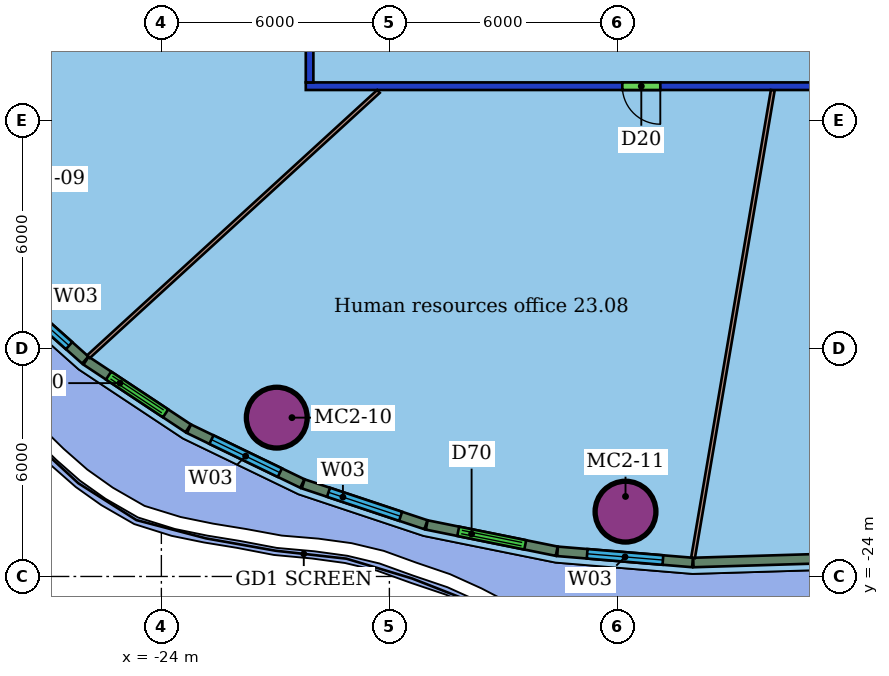
"""IFC4 building model, lengths in metres.
Left out: names, types, materials, properties, quantities, classifications, styles, units other than length and angle.
Written with IfcOpenShell. Run it as: python <this file> out.ifc"""

import sys

from ifc_helpers import new_model, si_unit, direction, frame, frame_2d, origin, origin_2d, place, context, subcontext, project, spatial, rectangle, hollow_circle, extrude, element, fill, save


model = new_model("IFC4")
c1 = context("Model", 3, precision=1e-05, world=origin(), true_north=direction((0.0, 1.0)))
c2 = subcontext(c1, "Body", "Model", "MODEL_VIEW")
j1 = project(units=[si_unit("LENGTHUNIT", "METRE"), si_unit("PLANEANGLEUNIT", "RADIAN")], contexts=[c1])
p1 = place(None, origin())
s1 = spatial("IfcSite", under=j1, at=p1, CompositionType="ELEMENT")
p2 = place(p1, origin())
s2 = spatial("IfcBuilding", under=s1, at=p2, CompositionType="ELEMENT")
p3 = place(p2, frame((0.0, 0.0, 103.0)))
s3 = spatial("IfcBuildingStorey", under=s2, at=p3, CompositionType="ELEMENT", Elevation=103.0)
for number, where, z_axis, x_axis in (
    (1, (-20.963, -19.821, 0.0), (0.0, 0.0, 1.0), (1.0, 0.0, 0.0)),
    (2, (-11.787, -22.294, 0.0), (0.0, 0.0, 1.0), (1.0, 0.0, 0.0)),
):
    element("IfcColumn", number, at=place(p3, frame(where, z_axis=z_axis, x_axis=x_axis)), inside=s3, PredefinedType="COLUMN", context=c2, shape_type="SweptSolid", body=[
        extrude(hollow_circle(Radius=0.8, WallThickness=0.055, at=origin_2d()), origin(), (0.0, 0.0, 1.0), 3.45),
    ])
p4 = place(p3, frame((8.2, -11.1, 0.0), z_axis=(0.0, 0.0, 1.0), x_axis=(-1.0, 0.0, 0.0)))
e3 = element("IfcWall", 3, at=p4, inside=s3, PredefinedType="PARTITIONING", context=c2, shape_type="SweptSolid", body=[
    extrude(rectangle(XDim=28.4, YDim=0.2, at=frame_2d((14.2, 0.0))), origin(), (0.0, 0.0, 1.0), 3.0),
])
p5 = place(p4, frame((19.071, 0.0, 0.0)))
e4 = element("IfcOpeningElement", 4, at=p5, cuts=e3, PredefinedType="OPENING", context=c2, shape_type="SweptSolid", body=[
    extrude(rectangle(XDim=1.0, YDim=2.1, at=frame_2d((0.5, 1.05))), frame((0.0, 0.11, 0.0), z_axis=(0.0, -1.0, 0.0), x_axis=(1.0, 0.0, 0.0)), (0.0, 0.0, 1.0), 0.22),
])
p6 = place(p4, frame((9.847, 0.0, 0.0)))
e5 = element("IfcOpeningElement", 5, at=p6, cuts=e3, PredefinedType="OPENING", context=c2, shape_type="SweptSolid", body=[
    extrude(rectangle(XDim=1.8, YDim=2.1, at=frame_2d((0.9, 1.05))), frame((0.0, 0.11, 0.0), z_axis=(0.0, -1.0, 0.0), x_axis=(1.0, 0.0, 0.0)), (0.0, 0.0, 1.0), 0.22),
])
p7 = place(p3, frame((-20.1, -11.0, 0.0), z_axis=(0.0, 0.0, 1.0), x_axis=(0.0, 1.0, 0.0)))
e6 = element("IfcWall", 6, at=p7, inside=s3, PredefinedType="PARTITIONING", context=c2, shape_type="SweptSolid", body=[
    extrude(rectangle(XDim=22.0, YDim=0.2, at=frame_2d((11.0, 0.0))), origin(), (0.0, 0.0, 1.0), 3.0),
])
p8 = place(p7, frame((15.485, 0.0, 0.0)))
e7 = element("IfcOpeningElement", 7, at=p8, cuts=e6, PredefinedType="OPENING", context=c2, shape_type="SweptSolid", body=[
    extrude(rectangle(XDim=1.5, YDim=2.1, at=frame_2d((0.75, 1.05))), frame((0.0, 0.11, 0.0), z_axis=(0.0, -1.0, 0.0), x_axis=(1.0, 0.0, 0.0)), (0.0, 0.0, 1.0), 0.22),
])
p9 = place(p7, frame((9.038, 0.0, 0.0)))
e8 = element("IfcOpeningElement", 8, at=p9, cuts=e6, PredefinedType="OPENING", context=c2, shape_type="SweptSolid", body=[
    extrude(rectangle(XDim=0.9, YDim=2.1, at=frame_2d((0.45, 1.05))), frame((0.0, 0.11, 0.0), z_axis=(0.0, -1.0, 0.0), x_axis=(1.0, 0.0, 0.0)), (0.0, 0.0, 1.0), 0.22),
])
p10 = place(p7, frame((4.808, 0.0, 0.0)))
e9 = element("IfcOpeningElement", 9, at=p10, cuts=e6, PredefinedType="OPENING", context=c2, shape_type="SweptSolid", body=[
    extrude(rectangle(XDim=1.0, YDim=2.1, at=frame_2d((0.5, 1.05))), frame((0.0, 0.11, 0.0), z_axis=(0.0, -1.0, 0.0), x_axis=(1.0, 0.0, 0.0)), (0.0, 0.0, 1.0), 0.22),
])
p11 = place(p3, frame((-25.917, -18.215, 0.0), z_axis=(0.0, 0.0, 1.0), x_axis=(0.737925997796, 0.674881635383, 0.0)))
e10 = element("IfcWall", 10, at=p11, inside=s3, PredefinedType="PARTITIONING", context=c2, shape_type="SweptSolid", body=[
    extrude(rectangle(XDim=10.34, YDim=0.1, at=frame_2d((5.17, 0.0))), origin(), (0.0, 0.0, 1.0), 3.45),
])
p12 = place(p3, frame((-10.01, -23.508, 0.0), z_axis=(0.0, 0.0, 1.0), x_axis=(0.168138794108, 0.985763331594, 0.0)))
e11 = element("IfcWall", 11, at=p12, inside=s3, PredefinedType="PARTITIONING", context=c2, shape_type="SweptSolid", body=[
    extrude(rectangle(XDim=12.477, YDim=0.1, at=frame_2d((6.239, 0.0))), origin(), (0.0, 0.0, 1.0), 3.45),
])
p13 = place(p3, frame((-28.347, -16.218, 0.0), z_axis=(0.0, 0.0, 1.0), x_axis=(0.746859935175, -0.664981381116, 0.0)))
e12 = element("IfcWall", 12, at=p13, inside=s3, PredefinedType="SOLIDWALL", context=c2, shape_type="SweptSolid", body=[
    extrude(rectangle(XDim=3.14, YDim=0.25, at=frame_2d((1.57, 0.0))), origin(), (0.0, 0.0, 1.0), 3.05),
])
p14 = place(p13, frame((0.57, 0.0, 0.9)))
e13 = element("IfcOpeningElement", 13, at=p14, cuts=e12, PredefinedType="OPENING", context=c2, shape_type="SweptSolid", body=[
    extrude(rectangle(XDim=2.0, YDim=2.1, at=frame_2d((1.0, 1.05))), frame((0.0, 0.135, 0.0), z_axis=(0.0, -1.0, 0.0), x_axis=(1.0, 0.0, 0.0)), (0.0, 0.0, 1.0), 0.27),
])
p15 = place(p3, frame((-25.982, -18.321, 0.0), z_axis=(0.0, 0.0, 1.0), x_axis=(0.833643452757, -0.552302990827, 0.0)))
e14 = element("IfcWall", 14, at=p15, inside=s3, PredefinedType="SOLIDWALL", context=c2, shape_type="SweptSolid", body=[
    extrude(rectangle(XDim=3.223, YDim=0.25, at=frame_2d((1.611, 0.0))), origin(), (0.0, 0.0, 1.0), 3.05),
])
p16 = place(p15, frame((0.711, 0.0, 0.0)))
e15 = element("IfcOpeningElement", 15, at=p16, cuts=e14, PredefinedType="OPENING", context=c2, shape_type="SweptSolid", body=[
    extrude(rectangle(XDim=1.8, YDim=2.4, at=frame_2d((0.9, 1.2))), frame((0.0, 0.135, 0.0), z_axis=(0.0, -1.0, 0.0), x_axis=(1.0, 0.0, 0.0)), (0.0, 0.0, 1.0), 0.27),
])
p17 = place(p3, frame((-23.274, -20.114, 0.0), z_axis=(0.0, 0.0, 1.0), x_axis=(0.900502882427, -0.43485004167, 0.0)))
e16 = element("IfcWall", 16, at=p17, inside=s3, PredefinedType="SOLIDWALL", context=c2, shape_type="SweptSolid", body=[
    extrude(rectangle(XDim=3.313, YDim=0.25, at=frame_2d((1.656, 0.0))), origin(), (0.0, 0.0, 1.0), 3.05),
])
p18 = place(p17, frame((0.656, 0.0, 0.9)))
e17 = element("IfcOpeningElement", 17, at=p18, cuts=e16, PredefinedType="OPENING", context=c2, shape_type="SweptSolid", body=[
    extrude(rectangle(XDim=2.0, YDim=2.1, at=frame_2d((1.0, 1.05))), frame((0.0, 0.135, 0.0), z_axis=(0.0, -1.0, 0.0), x_axis=(1.0, 0.0, 0.0)), (0.0, 0.0, 1.0), 0.27),
])
p19 = place(p3, frame((-20.268, -21.563, 0.0), z_axis=(0.0, 0.0, 1.0), x_axis=(0.948762176605, -0.315991031903, 0.0)))
e18 = element("IfcWall", 18, at=p19, inside=s3, PredefinedType="SOLIDWALL", context=c2, shape_type="SweptSolid", body=[
    extrude(rectangle(XDim=3.403, YDim=0.25, at=frame_2d((1.702, 0.0))), origin(), (0.0, 0.0, 1.0), 3.05),
])
p20 = place(p19, frame((0.702, 0.0, 0.9)))
e19 = element("IfcOpeningElement", 19, at=p20, cuts=e18, PredefinedType="OPENING", context=c2, shape_type="SweptSolid", body=[
    extrude(rectangle(XDim=2.0, YDim=2.1, at=frame_2d((1.0, 1.05))), frame((0.0, 0.135, 0.0), z_axis=(0.0, -1.0, 0.0), x_axis=(1.0, 0.0, 0.0)), (0.0, 0.0, 1.0), 0.27),
])
p21 = place(p3, frame((-17.017, -22.645, 0.0), z_axis=(0.0, 0.0, 1.0), x_axis=(0.980191158743, -0.198053761191, 0.0)))
e20 = element("IfcWall", 20, at=p21, inside=s3, PredefinedType="SOLIDWALL", context=c2, shape_type="SweptSolid", body=[
    extrude(rectangle(XDim=3.489, YDim=0.25, at=frame_2d((1.744, 0.0))), origin(), (0.0, 0.0, 1.0), 3.05),
])
p22 = place(p21, frame((0.844, 0.0, 0.0)))
e21 = element("IfcOpeningElement", 21, at=p22, cuts=e20, PredefinedType="OPENING", context=c2, shape_type="SweptSolid", body=[
    extrude(rectangle(XDim=1.8, YDim=2.4, at=frame_2d((0.9, 1.2))), frame((0.0, 0.135, 0.0), z_axis=(0.0, -1.0, 0.0), x_axis=(1.0, 0.0, 0.0)), (0.0, 0.0, 1.0), 0.27),
])
p23 = place(p3, frame((-13.575, -23.339, 0.0), z_axis=(0.0, 0.0, 1.0), x_axis=(0.996602699612, -0.082359329318, 0.0)))
e22 = element("IfcWall", 22, at=p23, inside=s3, PredefinedType="SOLIDWALL", context=c2, shape_type="SweptSolid", body=[
    extrude(rectangle(XDim=3.563, YDim=0.25, at=frame_2d((1.782, 0.0))), origin(), (0.0, 0.0, 1.0), 3.05),
])
p24 = place(p23, frame((0.781, 0.0, 0.9)))
e23 = element("IfcOpeningElement", 23, at=p24, cuts=e22, PredefinedType="OPENING", context=c2, shape_type="SweptSolid", body=[
    extrude(rectangle(XDim=2.0, YDim=2.1, at=frame_2d((1.0, 1.05))), frame((0.0, 0.135, 0.0), z_axis=(0.0, -1.0, 0.0), x_axis=(1.0, 0.0, 0.0)), (0.0, 0.0, 1.0), 0.27),
])
p25 = place(p3, frame((-10.002, -23.633, 0.0), z_axis=(0.0, 0.0, 1.0), x_axis=(0.999541179145, 0.030289126641, 0.0)))
e24 = element("IfcWall", 24, at=p25, inside=s3, PredefinedType="SOLIDWALL", context=c2, shape_type="SweptSolid", body=[
    extrude(rectangle(XDim=3.579, YDim=0.25, at=frame_2d((1.79, 0.0))), origin(), (0.0, 0.0, 1.0), 3.05),
])
p26 = place(p5, origin())
e25 = element("IfcDoor", 25, at=p26, inside=s3, OperationType="SINGLE_SWING_LEFT", PredefinedType="DOOR", context=c2, shape_type="SweptSolid", body=[
    extrude(rectangle(XDim=1.0, YDim=2.1, at=frame_2d((0.5, 1.05))), frame((0.0, 0.025, 0.0), z_axis=(0.0, -1.0, 0.0), x_axis=(1.0, 0.0, 0.0)), (0.0, 0.0, 1.0), 0.05),
])
fill(e4, e25)
p27 = place(p14, origin())
e26 = element("IfcWindow", 26, at=p27, inside=s3, PartitioningType="SINGLE_PANEL", PredefinedType="WINDOW", context=c2, shape_type="SweptSolid", body=[
    extrude(rectangle(XDim=2.0, YDim=2.1, at=frame_2d((1.0, 1.05))), frame((0.0, 0.03, 0.0), z_axis=(0.0, -1.0, 0.0), x_axis=(1.0, 0.0, 0.0)), (0.0, 0.0, 1.0), 0.06),
])
fill(e13, e26)
p28 = place(p16, origin())
e27 = element("IfcDoor", 27, at=p28, inside=s3, OperationType="DOUBLE_DOOR_SLIDING", PredefinedType="DOOR", context=c2, shape_type="SweptSolid", body=[
    extrude(rectangle(XDim=1.8, YDim=2.4, at=frame_2d((0.9, 1.2))), frame((0.0, 0.025, 0.0), z_axis=(0.0, -1.0, 0.0), x_axis=(1.0, 0.0, 0.0)), (0.0, 0.0, 1.0), 0.05),
])
fill(e15, e27)
p29 = place(p18, origin())
e28 = element("IfcWindow", 28, at=p29, inside=s3, PartitioningType="SINGLE_PANEL", PredefinedType="WINDOW", context=c2, shape_type="SweptSolid", body=[
    extrude(rectangle(XDim=2.0, YDim=2.1, at=frame_2d((1.0, 1.05))), frame((0.0, 0.03, 0.0), z_axis=(0.0, -1.0, 0.0), x_axis=(1.0, 0.0, 0.0)), (0.0, 0.0, 1.0), 0.06),
])
fill(e17, e28)
p30 = place(p20, origin())
e29 = element("IfcWindow", 29, at=p30, inside=s3, PartitioningType="SINGLE_PANEL", PredefinedType="WINDOW", context=c2, shape_type="SweptSolid", body=[
    extrude(rectangle(XDim=2.0, YDim=2.1, at=frame_2d((1.0, 1.05))), frame((0.0, 0.03, 0.0), z_axis=(0.0, -1.0, 0.0), x_axis=(1.0, 0.0, 0.0)), (0.0, 0.0, 1.0), 0.06),
])
fill(e19, e29)
p31 = place(p22, origin())
e30 = element("IfcDoor", 30, at=p31, inside=s3, OperationType="DOUBLE_DOOR_SLIDING", PredefinedType="DOOR", context=c2, shape_type="SweptSolid", body=[
    extrude(rectangle(XDim=1.8, YDim=2.4, at=frame_2d((0.9, 1.2))), frame((0.0, 0.025, 0.0), z_axis=(0.0, -1.0, 0.0), x_axis=(1.0, 0.0, 0.0)), (0.0, 0.0, 1.0), 0.05),
])
fill(e21, e30)
p32 = place(p24, origin())
e31 = element("IfcWindow", 31, at=p32, inside=s3, PartitioningType="SINGLE_PANEL", PredefinedType="WINDOW", context=c2, shape_type="SweptSolid", body=[
    extrude(rectangle(XDim=2.0, YDim=2.1, at=frame_2d((1.0, 1.05))), frame((0.0, 0.03, 0.0), z_axis=(0.0, -1.0, 0.0), x_axis=(1.0, 0.0, 0.0)), (0.0, 0.0, 1.0), 0.06),
])
fill(e23, e31)
save(model, sys.argv[1])
